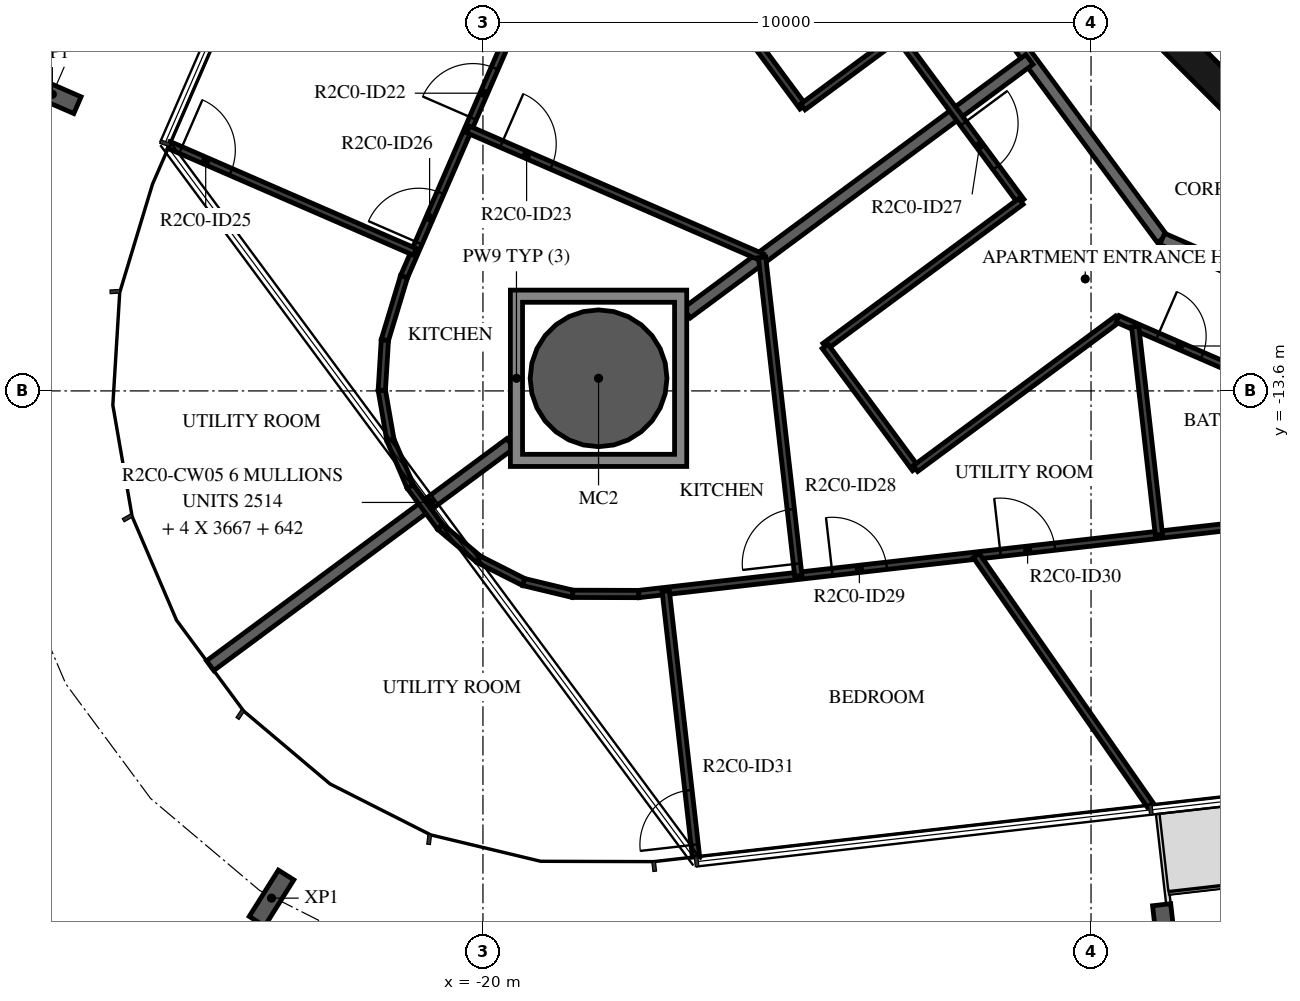
"""IFC4 building model, lengths in metres.
Left out: names, types, materials, properties, quantities, classifications, styles, units other than length and angle.
Written with IfcOpenShell. Run it as: python <this file> out.ifc"""

import sys

from ifc_helpers import new_model, si_unit, direction, frame, frame_2d, origin, origin_2d, place, context, subcontext, project, spatial, polyline, rectangle, hollow_circle, i_section, outline, extrude, element, fill, save


model = new_model("IFC4")
c1 = context("Model", 3, precision=1e-05, world=origin(), true_north=direction((0.0, 1.0)))
c2 = subcontext(c1, "Body", "Model", "MODEL_VIEW")
j1 = project(units=[si_unit("LENGTHUNIT", "METRE"), si_unit("PLANEANGLEUNIT", "RADIAN")], contexts=[c1])
p1 = place(None, origin())
s1 = spatial("IfcSite", under=j1, at=p1, CompositionType="ELEMENT")
p2 = place(p1, origin())
s2 = spatial("IfcBuilding", under=s1, at=p2, CompositionType="ELEMENT")
p3 = place(p2, frame((0.0, 0.0, 104.7)))
s3 = spatial("IfcBuildingStorey", under=s2, at=p3, CompositionType="ELEMENT", Elevation=104.7)
p4 = place(p3, frame((-18.099, -13.393, -0.38), z_axis=(0.0, 0.0, 1.0), x_axis=(1.0, 0.0, 0.0)))
e1 = element("IfcColumn", 1, at=p4, inside=s3, PredefinedType="COLUMN", context=c2, shape_type="SweptSolid", body=[
    extrude(hollow_circle(Radius=1.125, WallThickness=0.055, at=origin_2d()), origin(), (0.0, 0.0, 1.0), 2.616),
])
for number, where, z_axis, x_axis in (
    (2, (-27.081, -8.722, -0.38), (0.0, 0.0, 1.0), (0.399, 0.917, 0.0)),
    (3, (-23.477, -21.941, -0.38), (0.0, 0.0, 1.0), (-0.846, 0.532, 0.0)),
    (4, (-8.788, -22.497, -0.38), (0.0, 0.0, 1.0), (-0.994, -0.113, 0.0)),
):
    element("IfcColumn", number, at=place(p3, frame(where, z_axis=z_axis, x_axis=x_axis)), inside=s3, PredefinedType="COLUMN", context=c2, shape_type="SweptSolid", body=[
        extrude(i_section(OverallWidth=0.3, OverallDepth=0.9, WebThickness=0.019, FlangeThickness=0.035, FilletRadius=0.03, at=origin_2d()), origin(), (0.0, 0.0, 1.0), 2.616),
    ])
p5 = place(p3, frame((-9.308, -7.164, 0.0), z_axis=(0.0, 0.0, 1.0), x_axis=(0.707106781187, -0.707106781187, 0.0)))
e5 = element("IfcWall", 5, at=p5, inside=s3, PredefinedType="SHEAR", context=c2, shape_type="SweptSolid", body=[
    extrude(rectangle(XDim=3.032, YDim=0.5, at=frame_2d((1.516, 0.0))), origin(), (0.0, 0.0, 1.0), 3.05),
])
p6 = place(p3, frame((-13.196, -5.198, 0.0), z_axis=(0.0, 0.0, 1.0), x_axis=(0.594805187394, -0.803869883159, 0.0)))
e6 = element("IfcWall", 6, at=p6, inside=s3, PredefinedType="STANDARD", context=c2, shape_type="SweptSolid", body=[
    extrude(rectangle(XDim=7.342, YDim=0.2, at=frame_2d((3.671, 0.0))), origin(), (0.0, 0.0, 1.0), 3.05),
])
p7 = place(p3, frame((-8.829, -11.1, 0.0), z_axis=(0.0, 0.0, 1.0), x_axis=(0.917063622491, -0.398740908742, 0.0)))
e7 = element("IfcWall", 7, at=p7, inside=s3, PredefinedType="STANDARD", context=c2, shape_type="SweptSolid", body=[
    extrude(rectangle(XDim=7.24, YDim=0.2, at=frame_2d((3.62, 0.0))), origin(), (0.0, 0.0, 1.0), 3.05),
])
p8 = place(p7, frame((6.04, 0.0, 0.0)))
e8 = element("IfcOpeningElement", 8, at=p8, cuts=e7, PredefinedType="OPENING", context=c2, shape_type="SweptSolid", body=[
    extrude(rectangle(XDim=1.0, YDim=2.1, at=frame_2d((0.5, 1.05))), frame((0.0, 0.11, 0.0), z_axis=(0.0, -1.0, 0.0), x_axis=(1.0, 0.0, 0.0)), (0.0, 0.0, 1.0), 0.22),
])
p9 = place(p3, frame((-16.649, -12.32, 0.0), z_axis=(0.0, 0.0, 1.0), x_axis=(0.803869204071, 0.594806105169, 0.0)))
e9 = element("IfcWall", 9, at=p9, inside=s3, PredefinedType="STANDARD", context=c2, shape_type="SweptSolid", body=[
    extrude(rectangle(XDim=7.011, YDim=0.2, at=frame_2d((3.506, 0.0))), origin(), (0.0, 0.0, 1.0), 3.05),
])
p10 = place(p3, frame((-24.486, -18.119, 0.0), z_axis=(0.0, 0.0, 1.0), x_axis=(0.80384227933, 0.594842491726, 0.0)))
e10 = element("IfcWall", 10, at=p10, inside=s3, PredefinedType="STANDARD", context=c2, shape_type="SweptSolid", body=[
    extrude(rectangle(XDim=6.142, YDim=0.2, at=frame_2d((3.071, 0.0))), origin(), (0.0, 0.0, 1.0), 3.05),
])
p11 = place(p3, frame((-15.75, -7.562, 0.0), z_axis=(0.0, 0.0, 1.0), x_axis=(0.594863421241, -0.803826791087, 0.0)))
e11 = element("IfcWall", 11, at=p11, inside=s3, PredefinedType="PARTITIONING", context=c2, shape_type="SweptSolid", body=[
    extrude(rectangle(XDim=1.7, YDim=0.12, at=frame_2d((0.85, 0.0))), origin(), (0.0, 0.0, 1.0), 3.05),
])
p12 = place(p3, frame((-14.739, -8.929, 0.0), z_axis=(0.0, 0.0, 1.0), x_axis=(0.803901491033, 0.594762467474, 0.0)))
e12 = element("IfcWall", 12, at=p12, inside=s3, PredefinedType="PARTITIONING", context=c2, shape_type="SweptSolid", body=[
    extrude(rectangle(XDim=1.959, YDim=0.12, at=frame_2d((0.979, 0.0))), origin(), (0.0, 0.0, 1.0), 3.05),
])
p13 = place(p3, frame((-13.164, -7.764, 0.0), z_axis=(0.0, 0.0, 1.0), x_axis=(0.594837409261, -0.803846040324, 0.0)))
e13 = element("IfcWall", 13, at=p13, inside=s3, PredefinedType="PARTITIONING", context=c2, shape_type="SweptSolid", body=[
    extrude(rectangle(XDim=3.383, YDim=0.12, at=frame_2d((1.691, 0.0))), origin(), (0.0, 0.0, 1.0), 3.05),
])
p14 = place(p13, frame((1.789, 0.0, 0.0)))
e14 = element("IfcOpeningElement", 14, at=p14, cuts=e13, PredefinedType="OPENING", context=c2, shape_type="SweptSolid", body=[
    extrude(rectangle(XDim=0.9, YDim=2.1, at=frame_2d((0.45, 1.05))), frame((0.0, 0.07, 0.0), z_axis=(0.0, -1.0, 0.0), x_axis=(1.0, 0.0, 0.0)), (0.0, 0.0, 1.0), 0.14),
])
p15 = place(p3, frame((-21.298, -11.722, 0.0), z_axis=(0.0, 0.0, 1.0), x_axis=(0.398738972546, 0.91706446435, 0.0)))
e15 = element("IfcWall", 15, at=p15, inside=s3, PredefinedType="PARTITIONING", context=c2, shape_type="SweptSolid", body=[
    extrude(rectangle(XDim=14.577, YDim=0.12, at=frame_2d((7.288, 0.0))), origin(), (0.0, 0.0, 1.0), 3.05),
])
p16 = place(p15, frame((2.841, 0.0, 0.0)))
e16 = element("IfcOpeningElement", 16, at=p16, cuts=e15, PredefinedType="OPENING", context=c2, shape_type="SweptSolid", body=[
    extrude(rectangle(XDim=0.9, YDim=2.1, at=frame_2d((0.45, 1.05))), frame((0.0, 0.07, 0.0), z_axis=(0.0, -1.0, 0.0), x_axis=(1.0, 0.0, 0.0)), (0.0, 0.0, 1.0), 0.14),
])
p17 = place(p15, frame((0.605, 0.0, 0.0)))
e17 = element("IfcOpeningElement", 17, at=p17, cuts=e15, PredefinedType="OPENING", context=c2, shape_type="SweptSolid", body=[
    extrude(rectangle(XDim=0.9, YDim=2.1, at=frame_2d((0.45, 1.05))), frame((0.0, 0.07, 0.0), z_axis=(0.0, -1.0, 0.0), x_axis=(1.0, 0.0, 0.0)), (0.0, 0.0, 1.0), 0.14),
])
p18 = place(p3, frame((-25.156, -9.559, 0.0), z_axis=(0.0, 0.0, 1.0), x_axis=(0.917042707292, -0.398789008127, 0.0)))
e18 = element("IfcWall", 18, at=p18, inside=s3, PredefinedType="PARTITIONING", context=c2, shape_type="SweptSolid", body=[
    extrude(rectangle(XDim=4.4, YDim=0.12, at=frame_2d((2.2, 0.0))), origin(), (0.0, 0.0, 1.0), 3.05),
])
p19 = place(p18, frame((0.2, 0.0, 0.0)))
e19 = element("IfcOpeningElement", 19, at=p19, cuts=e18, PredefinedType="OPENING", context=c2, shape_type="SweptSolid", body=[
    extrude(rectangle(XDim=0.9, YDim=2.1, at=frame_2d((0.45, 1.05))), frame((0.0, 0.07, 0.0), z_axis=(0.0, -1.0, 0.0), x_axis=(1.0, 0.0, 0.0)), (0.0, 0.0, 1.0), 0.14),
])
p20 = place(p3, frame((-20.245, -9.3, 0.0), z_axis=(0.0, 0.0, 1.0), x_axis=(0.91706784774, -0.398731190956, 0.0)))
e20 = element("IfcWall", 20, at=p20, inside=s3, PredefinedType="PARTITIONING", context=c2, shape_type="SweptSolid", body=[
    extrude(rectangle(XDim=5.272, YDim=0.12, at=frame_2d((2.636, 0.0))), origin(), (0.0, 0.0, 1.0), 3.05),
])
p21 = place(p20, frame((0.6, 0.0, 0.0)))
e21 = element("IfcOpeningElement", 21, at=p21, cuts=e20, PredefinedType="OPENING", context=c2, shape_type="SweptSolid", body=[
    extrude(rectangle(XDim=0.9, YDim=2.1, at=frame_2d((0.45, 1.05))), frame((0.0, 0.07, 0.0), z_axis=(0.0, -1.0, 0.0), x_axis=(1.0, 0.0, 0.0)), (0.0, 0.0, 1.0), 0.14),
])
for number, where, z_axis, x_axis in (
    (22, (-20.703, -15.835, 0.0), (0.0, 0.0, 1.0), (-0.595, 0.804, 0.0)),
    (23, (-21.196, -15.168, 0.0), (0.0, 0.0, 1.0), (-0.394, 0.919, 0.0)),
):
    element("IfcWall", number, at=place(p3, frame(where, z_axis=z_axis, x_axis=x_axis)), inside=s3, PredefinedType="PARTITIONING", context=c2, shape_type="SweptSolid", body=[
        extrude(rectangle(XDim=0.829, YDim=0.12, at=frame_2d((0.415, 0.0))), origin(), (0.0, 0.0, 1.0), 3.05),
    ])
p22 = place(p3, frame((-21.522, -14.406, 0.0), z_axis=(0.0, 0.0, 1.0), x_axis=(-0.170794347099, 0.985306698952, 0.0)))
e24 = element("IfcWall", 24, at=p22, inside=s3, PredefinedType="PARTITIONING", context=c2, shape_type="SweptSolid", body=[
    extrude(rectangle(XDim=0.829, YDim=0.12, at=frame_2d((0.415, 0.0))), origin(), (0.0, 0.0, 1.0), 3.05),
])
p23 = place(p3, frame((-21.664, -13.59, 0.0), z_axis=(0.0, 0.0, 1.0), x_axis=(0.061277779288, 0.998120751095, 0.0)))
e25 = element("IfcWall", 25, at=p23, inside=s3, PredefinedType="PARTITIONING", context=c2, shape_type="SweptSolid", body=[
    extrude(rectangle(XDim=0.829, YDim=0.12, at=frame_2d((0.414, 0.0))), origin(), (0.0, 0.0, 1.0), 3.05),
])
p24 = place(p3, frame((-21.613, -12.762, 0.0), z_axis=(0.0, 0.0, 1.0), x_axis=(0.289552239308, 0.95716221233, 0.0)))
e26 = element("IfcWall", 26, at=p24, inside=s3, PredefinedType="PARTITIONING", context=c2, shape_type="SweptSolid", body=[
    extrude(rectangle(XDim=1.087, YDim=0.12, at=frame_2d((0.543, 0.0))), origin(), (0.0, 0.0, 1.0), 3.05),
])
p25 = place(p3, frame((-11.152, -10.483, 0.0), z_axis=(0.0, 0.0, 1.0), x_axis=(-0.803843064298, -0.594841430954, 0.0)))
e27 = element("IfcWall", 27, at=p25, inside=s3, PredefinedType="PARTITIONING", context=c2, shape_type="SweptSolid", body=[
    extrude(rectangle(XDim=4.008, YDim=0.12, at=frame_2d((2.004, 0.0))), origin(), (0.0, 0.0, 1.0), 3.05),
])
p26 = place(p3, frame((-14.374, -12.867, 0.0), z_axis=(0.0, 0.0, 1.0), x_axis=(0.594800097121, -0.803873649565, 0.0)))
e28 = element("IfcWall", 28, at=p26, inside=s3, PredefinedType="PARTITIONING", context=c2, shape_type="SweptSolid", body=[
    extrude(rectangle(XDim=2.5, YDim=0.12, at=frame_2d((1.25, 0.0))), origin(), (0.0, 0.0, 1.0), 3.05),
])
p27 = place(p3, frame((-12.886, -14.877, 0.0), z_axis=(0.0, 0.0, 1.0), x_axis=(0.803816491389, 0.594877338761, 0.0)))
e29 = element("IfcWall", 29, at=p27, inside=s3, PredefinedType="PARTITIONING", context=c2, shape_type="SweptSolid", body=[
    extrude(rectangle(XDim=4.135, YDim=0.12, at=frame_2d((2.068, 0.0))), origin(), (0.0, 0.0, 1.0), 3.05),
])
p28 = place(p3, frame((-9.562, -12.417, 0.0), z_axis=(0.0, 0.0, 1.0), x_axis=(0.917063169851, -0.398741949767, 0.0)))
e30 = element("IfcWall", 30, at=p28, inside=s3, PredefinedType="PARTITIONING", context=c2, shape_type="SweptSolid", body=[
    extrude(rectangle(XDim=7.891, YDim=0.12, at=frame_2d((3.946, 0.0))), origin(), (0.0, 0.0, 1.0), 3.05),
])
p29 = place(p28, frame((0.715, 0.0, 0.0)))
e31 = element("IfcOpeningElement", 31, at=p29, cuts=e30, PredefinedType="OPENING", context=c2, shape_type="SweptSolid", body=[
    extrude(rectangle(XDim=0.8, YDim=2.1, at=frame_2d((0.4, 1.05))), frame((0.0, 0.07, 0.0), z_axis=(0.0, -1.0, 0.0), x_axis=(1.0, 0.0, 0.0)), (0.0, 0.0, 1.0), 0.14),
])
for number, where, z_axis, x_axis in (
    (32, (-20.703, -15.835, 0.0), (0.0, 0.0, 1.0), (0.764, -0.645, 0.0)),
    (33, (-20.069, -16.369, 0.0), (0.0, 0.0, 1.0), (0.892, -0.451, 0.0)),
):
    element("IfcWall", number, at=place(p3, frame(where, z_axis=z_axis, x_axis=x_axis)), inside=s3, PredefinedType="PARTITIONING", context=c2, shape_type="SweptSolid", body=[
        extrude(rectangle(XDim=0.829, YDim=0.12, at=frame_2d((0.415, 0.0))), origin(), (0.0, 0.0, 1.0), 3.05),
    ])
p30 = place(p3, frame((-19.33, -16.744, 0.0), z_axis=(0.0, 0.0, 1.0), x_axis=(0.972403343288, -0.23330610357, 0.0)))
e34 = element("IfcWall", 34, at=p30, inside=s3, PredefinedType="PARTITIONING", context=c2, shape_type="SweptSolid", body=[
    extrude(rectangle(XDim=0.829, YDim=0.12, at=frame_2d((0.415, 0.0))), origin(), (0.0, 0.0, 1.0), 3.05),
])
p31 = place(p3, frame((-18.524, -16.937, 0.0), z_axis=(0.0, 0.0, 1.0), x_axis=(0.999995736722, -0.00292002349, 0.0)))
e35 = element("IfcWall", 35, at=p31, inside=s3, PredefinedType="PARTITIONING", context=c2, shape_type="SweptSolid", body=[
    extrude(rectangle(XDim=1.087, YDim=0.12, at=frame_2d((0.543, 0.0))), origin(), (0.0, 0.0, 1.0), 3.05),
])
p32 = place(p3, frame((-17.437, -16.94, 0.0), z_axis=(0.0, 0.0, 1.0), x_axis=(0.993573314119, 0.113190412448, 0.0)))
e36 = element("IfcWall", 36, at=p32, inside=s3, PredefinedType="PARTITIONING", context=c2, shape_type="SweptSolid", body=[
    extrude(rectangle(XDim=14.576, YDim=0.12, at=frame_2d((7.288, 0.0))), origin(), (0.0, 0.0, 1.0), 3.05),
])
p33 = place(p32, frame((3.201, 0.0, 0.0)))
e37 = element("IfcOpeningElement", 37, at=p33, cuts=e36, PredefinedType="OPENING", context=c2, shape_type="SweptSolid", body=[
    extrude(rectangle(XDim=0.9, YDim=2.1, at=frame_2d((0.45, 1.05))), frame((0.0, 0.07, 0.0), z_axis=(0.0, -1.0, 0.0), x_axis=(1.0, 0.0, 0.0)), (0.0, 0.0, 1.0), 0.14),
])
p34 = place(p32, frame((5.985, 0.0, 0.0)))
e38 = element("IfcOpeningElement", 38, at=p34, cuts=e36, PredefinedType="OPENING", context=c2, shape_type="SweptSolid", body=[
    extrude(rectangle(XDim=0.9, YDim=2.1, at=frame_2d((0.45, 1.05))), frame((0.0, 0.07, 0.0), z_axis=(0.0, -1.0, 0.0), x_axis=(1.0, 0.0, 0.0)), (0.0, 0.0, 1.0), 0.14),
])
p35 = place(p3, frame((-14.813, -16.641, 0.0), z_axis=(0.0, 0.0, 1.0), x_axis=(-0.113210971478, 0.993570971767, 0.0)))
e39 = element("IfcWall", 39, at=p35, inside=s3, PredefinedType="PARTITIONING", context=c2, shape_type="SweptSolid", body=[
    extrude(rectangle(XDim=5.273, YDim=0.12, at=frame_2d((2.636, 0.0))), origin(), (0.0, 0.0, 1.0), 3.05),
])
p36 = place(p35, frame((0.2, 0.0, 0.0)))
e40 = element("IfcOpeningElement", 40, at=p36, cuts=e39, PredefinedType="OPENING", context=c2, shape_type="SweptSolid", body=[
    extrude(rectangle(XDim=0.9, YDim=2.1, at=frame_2d((0.45, 1.05))), frame((0.0, 0.07, 0.0), z_axis=(0.0, -1.0, 0.0), x_axis=(1.0, 0.0, 0.0)), (0.0, 0.0, 1.0), 0.14),
])
p37 = place(p3, frame((-16.496, -21.262, 0.0), z_axis=(0.0, 0.0, 1.0), x_axis=(-0.1132445713, 0.993567142709, 0.0)))
e41 = element("IfcWall", 41, at=p37, inside=s3, PredefinedType="PARTITIONING", context=c2, shape_type="SweptSolid", body=[
    extrude(rectangle(XDim=4.4, YDim=0.12, at=frame_2d((2.2, 0.0))), origin(), (0.0, 0.0, 1.0), 3.05),
])
p38 = place(p37, frame((0.2, 0.0, 0.0)))
e42 = element("IfcOpeningElement", 42, at=p38, cuts=e41, PredefinedType="OPENING", context=c2, shape_type="SweptSolid", body=[
    extrude(rectangle(XDim=0.9, YDim=2.1, at=frame_2d((0.45, 1.05))), frame((0.0, 0.07, 0.0), z_axis=(0.0, -1.0, 0.0), x_axis=(1.0, 0.0, 0.0)), (0.0, 0.0, 1.0), 0.14),
])
p39 = place(p3, frame((-8.884, -15.966, 0.0), z_axis=(0.0, 0.0, 1.0), x_axis=(-0.113230836929, 0.993568708026, 0.0)))
e43 = element("IfcWall", 43, at=p39, inside=s3, PredefinedType="PARTITIONING", context=c2, shape_type="SweptSolid", body=[
    extrude(rectangle(XDim=3.446, YDim=0.12, at=frame_2d((1.723, 0.0))), origin(), (0.0, 0.0, 1.0), 3.05),
])
p40 = place(p3, frame((-9.026, -20.41, 0.0), z_axis=(0.0, 0.0, 1.0), x_axis=(-0.57218083256, 0.82012748695, 0.0)))
e44 = element("IfcWall", 44, at=p40, inside=s3, PredefinedType="PARTITIONING", context=c2, shape_type="SweptSolid", body=[
    extrude(rectangle(XDim=5.002, YDim=0.12, at=frame_2d((2.501, 0.0))), origin(), (0.0, 0.0, 1.0), 3.05),
])
p41 = place(p3, origin())
e45 = element("IfcWall", 45, at=p41, inside=s3, PredefinedType="STANDARD", context=c2, shape_type="SweptSolid", body=[
    extrude(outline(polyline([(-16.649, -11.942), (-16.649, -14.843), (-19.549, -14.843), (-19.549, -11.942), (-16.649, -11.942)]), holes=[polyline([(-19.349, -14.643), (-16.849, -14.643), (-16.849, -12.143), (-19.349, -12.143), (-19.349, -14.643)])]), origin(), (0.0, 0.0, 1.0), 3.05),
])
p42 = place(p16, origin())
e46 = element("IfcDoor", 46, at=p42, inside=s3, OperationType="SINGLE_SWING_RIGHT", PredefinedType="DOOR", context=c2, shape_type="SweptSolid", body=[
    extrude(rectangle(XDim=0.9, YDim=2.1, at=frame_2d((0.45, 1.05))), frame((0.0, 0.025, 0.0), z_axis=(0.0, -1.0, 0.0), x_axis=(1.0, 0.0, 0.0)), (0.0, 0.0, 1.0), 0.05),
])
fill(e16, e46)
p43 = place(p21, origin())
e47 = element("IfcDoor", 47, at=p43, inside=s3, OperationType="SINGLE_SWING_RIGHT", PredefinedType="DOOR", context=c2, shape_type="SweptSolid", body=[
    extrude(rectangle(XDim=0.9, YDim=2.1, at=frame_2d((0.45, 1.05))), frame((0.0, 0.025, 0.0), z_axis=(0.0, -1.0, 0.0), x_axis=(1.0, 0.0, 0.0)), (0.0, 0.0, 1.0), 0.05),
])
fill(e21, e47)
p44 = place(p19, origin())
e48 = element("IfcDoor", 48, at=p44, inside=s3, OperationType="SINGLE_SWING_RIGHT", PredefinedType="DOOR", context=c2, shape_type="SweptSolid", body=[
    extrude(rectangle(XDim=0.9, YDim=2.1, at=frame_2d((0.45, 1.05))), frame((0.0, 0.025, 0.0), z_axis=(0.0, -1.0, 0.0), x_axis=(1.0, 0.0, 0.0)), (0.0, 0.0, 1.0), 0.05),
])
fill(e19, e48)
p45 = place(p17, origin())
e49 = element("IfcDoor", 49, at=p45, inside=s3, OperationType="SINGLE_SWING_LEFT", PredefinedType="DOOR", context=c2, shape_type="SweptSolid", body=[
    extrude(rectangle(XDim=0.9, YDim=2.1, at=frame_2d((0.45, 1.05))), frame((0.0, 0.025, 0.0), z_axis=(0.0, -1.0, 0.0), x_axis=(1.0, 0.0, 0.0)), (0.0, 0.0, 1.0), 0.05),
])
fill(e17, e49)
p46 = place(p14, origin())
e50 = element("IfcDoor", 50, at=p46, inside=s3, OperationType="SINGLE_SWING_LEFT", PredefinedType="DOOR", context=c2, shape_type="SweptSolid", body=[
    extrude(rectangle(XDim=0.9, YDim=2.1, at=frame_2d((0.45, 1.05))), frame((0.0, 0.025, 0.0), z_axis=(0.0, -1.0, 0.0), x_axis=(1.0, 0.0, 0.0)), (0.0, 0.0, 1.0), 0.05),
])
fill(e14, e50)
p47 = place(p29, origin())
e51 = element("IfcDoor", 51, at=p47, inside=s3, OperationType="SINGLE_SWING_LEFT", PredefinedType="DOOR", context=c2, shape_type="SweptSolid", body=[
    extrude(rectangle(XDim=0.8, YDim=2.1, at=frame_2d((0.4, 1.05))), frame((0.0, 0.025, 0.0), z_axis=(0.0, -1.0, 0.0), x_axis=(1.0, 0.0, 0.0)), (0.0, 0.0, 1.0), 0.05),
])
fill(e31, e51)
p48 = place(p36, origin())
e52 = element("IfcDoor", 52, at=p48, inside=s3, OperationType="SINGLE_SWING_LEFT", PredefinedType="DOOR", context=c2, shape_type="SweptSolid", body=[
    extrude(rectangle(XDim=0.9, YDim=2.1, at=frame_2d((0.45, 1.05))), frame((0.0, 0.025, 0.0), z_axis=(0.0, -1.0, 0.0), x_axis=(1.0, 0.0, 0.0)), (0.0, 0.0, 1.0), 0.05),
])
fill(e40, e52)
p49 = place(p33, origin())
e53 = element("IfcDoor", 53, at=p49, inside=s3, OperationType="SINGLE_SWING_LEFT", PredefinedType="DOOR", context=c2, shape_type="SweptSolid", body=[
    extrude(rectangle(XDim=0.9, YDim=2.1, at=frame_2d((0.45, 1.05))), frame((0.0, 0.025, 0.0), z_axis=(0.0, -1.0, 0.0), x_axis=(1.0, 0.0, 0.0)), (0.0, 0.0, 1.0), 0.05),
])
fill(e37, e53)
p50 = place(p34, origin())
e54 = element("IfcDoor", 54, at=p50, inside=s3, OperationType="SINGLE_SWING_LEFT", PredefinedType="DOOR", context=c2, shape_type="SweptSolid", body=[
    extrude(rectangle(XDim=0.9, YDim=2.1, at=frame_2d((0.45, 1.05))), frame((0.0, 0.025, 0.0), z_axis=(0.0, -1.0, 0.0), x_axis=(1.0, 0.0, 0.0)), (0.0, 0.0, 1.0), 0.05),
])
fill(e38, e54)
p51 = place(p38, origin())
e55 = element("IfcDoor", 55, at=p51, inside=s3, OperationType="SINGLE_SWING_LEFT", PredefinedType="DOOR", context=c2, shape_type="SweptSolid", body=[
    extrude(rectangle(XDim=0.9, YDim=2.1, at=frame_2d((0.45, 1.05))), frame((0.0, 0.025, 0.0), z_axis=(0.0, -1.0, 0.0), x_axis=(1.0, 0.0, 0.0)), (0.0, 0.0, 1.0), 0.05),
])
fill(e42, e55)
save(model, sys.argv[1])
